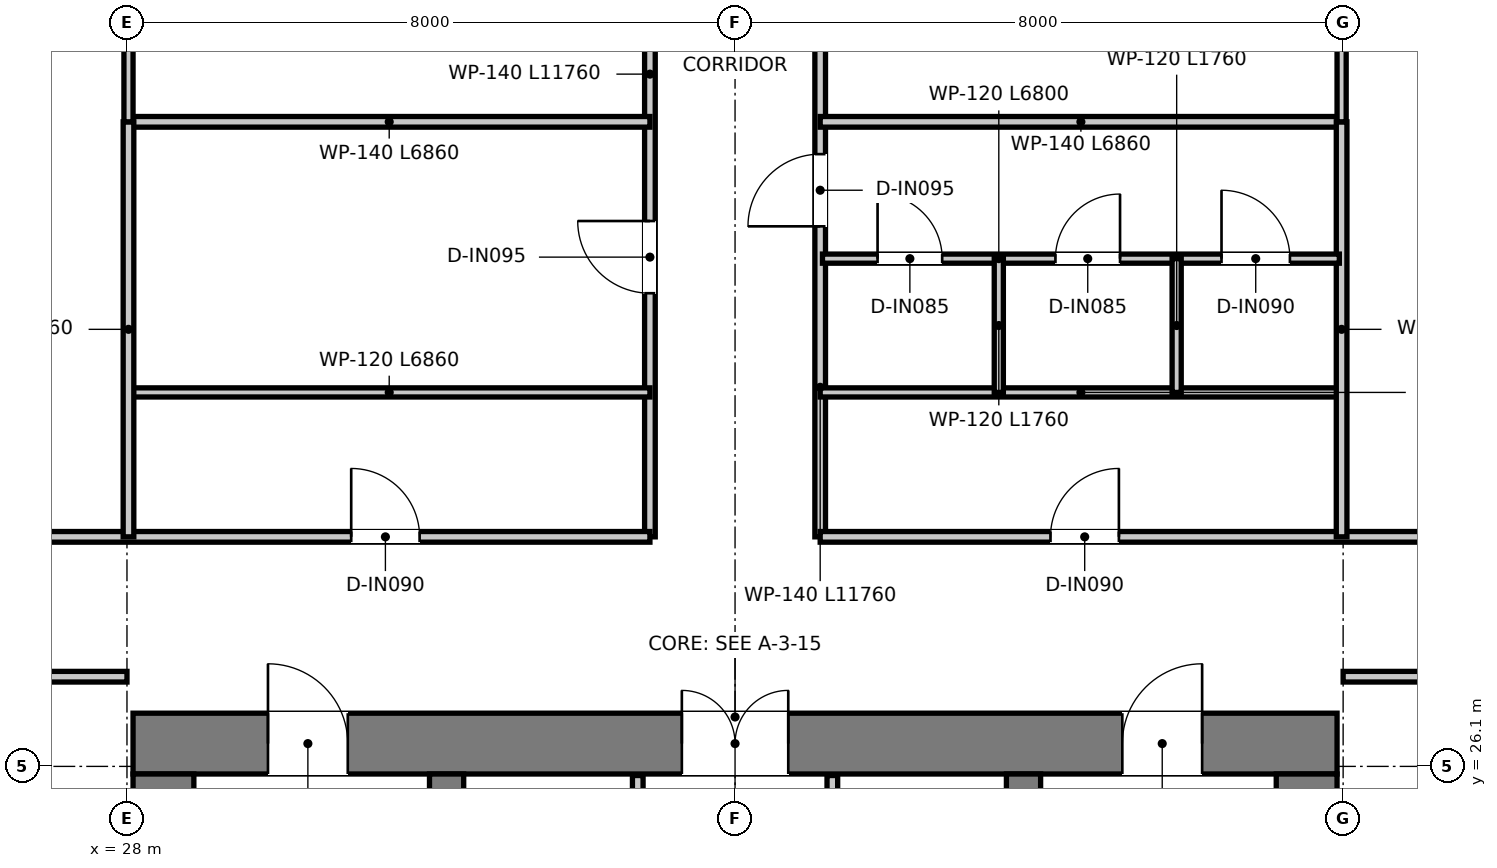
"""IFC4 building model, lengths in metres.
Left out: names, types, materials, properties, quantities, classifications, styles, units other than length and angle.
Written with IfcOpenShell. Run it as: python <this file> out.ifc"""

import sys

from ifc_helpers import new_model, si_unit, direction, frame, frame_2d, origin, place, context, subcontext, project, spatial, rectangle, extrude, element, fill, save


model = new_model("IFC4")
c1 = context("Model", 3, precision=1e-05, world=origin(), true_north=direction((0.0, 1.0)))
c2 = subcontext(c1, "Body", "Model", "MODEL_VIEW")
j1 = project(units=[si_unit("LENGTHUNIT", "METRE"), si_unit("PLANEANGLEUNIT", "RADIAN")], contexts=[c1])
p1 = place(None, origin())
s1 = spatial("IfcSite", under=j1, at=p1, CompositionType="ELEMENT")
p2 = place(p1, origin())
s2 = spatial("IfcBuilding", under=s1, at=p2, CompositionType="ELEMENT")
p3 = place(p2, frame((0.0, 0.0, 197.55)))
s3 = spatial("IfcBuildingStorey", under=s2, at=p3, CompositionType="ELEMENT", Elevation=197.55)
p4 = place(p3, frame((28.08, 26.4, 0.0), z_axis=(0.0, 0.0, 1.0), x_axis=(1.0, 0.0, 0.0)))
e1 = element("IfcWall", 1, at=p4, inside=s3, PredefinedType="SHEAR", context=c2, shape_type="SweptSolid", body=[
    extrude(rectangle(XDim=15.84, YDim=0.8, at=frame_2d((7.92, 0.0))), origin(), (0.0, 0.0, 1.0), 3.95),
])
p5 = place(p4, frame((7.22, 0.0, 0.0)))
e2 = element("IfcOpeningElement", 2, at=p5, cuts=e1, PredefinedType="OPENING", context=c2, shape_type="SweptSolid", body=[
    extrude(rectangle(XDim=1.4, YDim=2.2, at=frame_2d((0.7, 1.1))), frame((0.0, 0.41, 0.0), z_axis=(0.0, -1.0, 0.0), x_axis=(1.0, 0.0, 0.0)), (0.0, 0.0, 1.0), 0.82),
])
p6 = place(p4, frame((1.775, 0.0, 0.0)))
e3 = element("IfcOpeningElement", 3, at=p6, cuts=e1, PredefinedType="OPENING", context=c2, shape_type="SweptSolid", body=[
    extrude(rectangle(XDim=1.05, YDim=2.1, at=frame_2d((0.525, 1.05))), frame((0.0, 0.41, 0.0), z_axis=(0.0, -1.0, 0.0), x_axis=(1.0, 0.0, 0.0)), (0.0, 0.0, 1.0), 0.82),
])
p7 = place(p4, frame((13.015, 0.0, 0.0)))
e4 = element("IfcOpeningElement", 4, at=p7, cuts=e1, PredefinedType="OPENING", context=c2, shape_type="SweptSolid", body=[
    extrude(rectangle(XDim=1.05, YDim=2.1, at=frame_2d((0.525, 1.05))), frame((0.0, 0.41, 0.0), z_axis=(0.0, -1.0, 0.0), x_axis=(1.0, 0.0, 0.0)), (0.0, 0.0, 1.0), 0.82),
])
for number, where, z_axis, x_axis in (
    (5, (28.48, 11.3, 0.0), (0.0, 0.0, 1.0), (0.0, 1.0, 0.0)),
    (6, (43.52, 11.3, 0.0), (0.0, 0.0, 1.0), (0.0, 1.0, 0.0)),
):
    element("IfcWall", number, at=place(p3, frame(where, z_axis=z_axis, x_axis=x_axis)), inside=s3, PredefinedType="SHEAR", context=c2, shape_type="SweptSolid", body=[
        extrude(rectangle(XDim=14.7, YDim=0.8, at=frame_2d((7.35, 0.0))), origin(), (0.0, 0.0, 1.0), 3.95),
    ])
p8 = place(p3, frame((32.205, 13.22, 0.0), z_axis=(0.0, 0.0, 1.0), x_axis=(0.0, 1.0, 0.0)))
e7 = element("IfcWall", 7, at=p8, inside=s3, PredefinedType="SHEAR", context=c2, shape_type="SweptSolid", body=[
    extrude(rectangle(XDim=12.78, YDim=0.45, at=frame_2d((6.39, 0.0))), origin(), (0.0, 0.0, 1.0), 3.95),
])
p9 = place(p8, frame((10.58, 0.0, 0.0)))
e8 = element("IfcOpeningElement", 8, at=p9, cuts=e7, PredefinedType="OPENING", context=c2, shape_type="SweptSolid", body=[
    extrude(rectangle(XDim=1.1, YDim=2.15, at=frame_2d((0.55, 1.075))), frame((0.0, 0.235, 0.0), z_axis=(0.0, -1.0, 0.0), x_axis=(1.0, 0.0, 0.0)), (0.0, 0.0, 1.0), 0.47),
])
p10 = place(p3, frame((39.795, 13.22, 0.0), z_axis=(0.0, 0.0, 1.0), x_axis=(0.0, 1.0, 0.0)))
e9 = element("IfcWall", 9, at=p10, inside=s3, PredefinedType="SHEAR", context=c2, shape_type="SweptSolid", body=[
    extrude(rectangle(XDim=12.78, YDim=0.45, at=frame_2d((6.39, 0.0))), origin(), (0.0, 0.0, 1.0), 3.95),
])
p11 = place(p10, frame((10.58, 0.0, 0.0)))
e10 = element("IfcOpeningElement", 10, at=p11, cuts=e9, PredefinedType="OPENING", context=c2, shape_type="SweptSolid", body=[
    extrude(rectangle(XDim=1.1, YDim=2.15, at=frame_2d((0.55, 1.075))), frame((0.0, 0.235, 0.0), z_axis=(0.0, -1.0, 0.0), x_axis=(1.0, 0.0, 0.0)), (0.0, 0.0, 1.0), 0.47),
])
p12 = place(p3, frame((34.72, 20.2, 0.0), z_axis=(0.0, 0.0, 1.0), x_axis=(0.0, 1.0, 0.0)))
e11 = element("IfcWall", 11, at=p12, inside=s3, PredefinedType="PARTITIONING", context=c2, shape_type="SweptSolid", body=[
    extrude(rectangle(XDim=5.78, YDim=0.14, at=frame_2d((2.89, 0.0))), origin(), (0.0, 0.0, 1.0), 2.59),
])
p13 = place(p12, frame((1.05, 0.0, 0.0)))
e12 = element("IfcOpeningElement", 12, at=p13, cuts=e11, PredefinedType="OPENING", context=c2, shape_type="SweptSolid", body=[
    extrude(rectangle(XDim=0.9, YDim=2.1, at=frame_2d((0.45, 1.05))), frame((0.0, 0.08, 0.0), z_axis=(0.0, -1.0, 0.0), x_axis=(1.0, 0.0, 0.0)), (0.0, 0.0, 1.0), 0.16),
])
p14 = place(p3, frame((37.28, 20.2, 0.0), z_axis=(0.0, 0.0, 1.0), x_axis=(0.0, 1.0, 0.0)))
e13 = element("IfcWall", 13, at=p14, inside=s3, PredefinedType="PARTITIONING", context=c2, shape_type="SweptSolid", body=[
    extrude(rectangle(XDim=5.78, YDim=0.14, at=frame_2d((2.89, 0.0))), origin(), (0.0, 0.0, 1.0), 2.59),
])
p15 = place(p14, frame((0.95, 0.0, 0.0)))
e14 = element("IfcOpeningElement", 14, at=p15, cuts=e13, PredefinedType="OPENING", context=c2, shape_type="SweptSolid", body=[
    extrude(rectangle(XDim=1.1, YDim=2.15, at=frame_2d((0.55, 1.075))), frame((0.0, 0.08, 0.0), z_axis=(0.0, -1.0, 0.0), x_axis=(1.0, 0.0, 0.0)), (0.0, 0.0, 1.0), 0.16),
])
p16 = place(p3, frame((34.88, 29.12, 0.0), z_axis=(0.0, 0.0, 1.0), x_axis=(0.0, 1.0, 0.0)))
e15 = element("IfcWall", 15, at=p16, inside=s3, PredefinedType="PARTITIONING", context=c2, shape_type="SweptSolid", body=[
    extrude(rectangle(XDim=11.76, YDim=0.14, at=frame_2d((5.88, 0.0))), origin(), (0.0, 0.0, 1.0), 2.95),
])
p17 = place(p16, frame((3.205, 0.0, 0.0)))
e16 = element("IfcOpeningElement", 16, at=p17, cuts=e15, PredefinedType="OPENING", context=c2, shape_type="SweptSolid", body=[
    extrude(rectangle(XDim=0.95, YDim=2.1, at=frame_2d((0.475, 1.05))), frame((0.0, 0.08, 0.0), z_axis=(0.0, -1.0, 0.0), x_axis=(1.0, 0.0, 0.0)), (0.0, 0.0, 1.0), 0.16),
])
p18 = place(p16, frame((8.02, 0.0, 0.0)))
e17 = element("IfcOpeningElement", 17, at=p18, cuts=e15, PredefinedType="OPENING", context=c2, shape_type="SweptSolid", body=[
    extrude(rectangle(XDim=0.9, YDim=2.1, at=frame_2d((0.45, 1.05))), frame((0.0, 0.08, 0.0), z_axis=(0.0, -1.0, 0.0), x_axis=(1.0, 0.0, 0.0)), (0.0, 0.0, 1.0), 0.16),
])
p19 = place(p3, frame((37.12, 29.12, 0.0), z_axis=(0.0, 0.0, 1.0), x_axis=(0.0, 1.0, 0.0)))
e18 = element("IfcWall", 18, at=p19, inside=s3, PredefinedType="PARTITIONING", context=c2, shape_type="SweptSolid", body=[
    extrude(rectangle(XDim=11.76, YDim=0.14, at=frame_2d((5.88, 0.0))), origin(), (0.0, 0.0, 1.0), 2.95),
])
p20 = place(p19, frame((4.085, 0.0, 0.0)))
e19 = element("IfcOpeningElement", 19, at=p20, cuts=e18, PredefinedType="OPENING", context=c2, shape_type="SweptSolid", body=[
    extrude(rectangle(XDim=0.95, YDim=2.1, at=frame_2d((0.475, 1.05))), frame((0.0, 0.08, 0.0), z_axis=(0.0, -1.0, 0.0), x_axis=(1.0, 0.0, 0.0)), (0.0, 0.0, 1.0), 0.16),
])
p21 = place(p19, frame((8.02, 0.0, 0.0)))
e20 = element("IfcOpeningElement", 20, at=p21, cuts=e18, PredefinedType="OPENING", context=c2, shape_type="SweptSolid", body=[
    extrude(rectangle(XDim=0.9, YDim=2.1, at=frame_2d((0.45, 1.05))), frame((0.0, 0.08, 0.0), z_axis=(0.0, -1.0, 0.0), x_axis=(1.0, 0.0, 0.0)), (0.0, 0.0, 1.0), 0.16),
])
p22 = place(p3, frame((10.765, 29.12, 0.0), z_axis=(0.0, 0.0, 1.0), x_axis=(1.0, 0.0, 0.0)))
e21 = element("IfcWall", 21, at=p22, inside=s3, PredefinedType="PARTITIONING", context=c2, shape_type="SweptSolid", body=[
    extrude(rectangle(XDim=24.115, YDim=0.14, at=frame_2d((12.058, 0.0))), origin(), (0.0, 0.0, 1.0), 2.95),
])
p23 = place(p22, frame((20.185, 0.0, 0.0)))
e22 = element("IfcOpeningElement", 22, at=p23, cuts=e21, PredefinedType="OPENING", context=c2, shape_type="SweptSolid", body=[
    extrude(rectangle(XDim=0.9, YDim=2.1, at=frame_2d((0.45, 1.05))), frame((0.0, 0.08, 0.0), z_axis=(0.0, -1.0, 0.0), x_axis=(1.0, 0.0, 0.0)), (0.0, 0.0, 1.0), 0.16),
])
p24 = place(p22, frame((4.115, 0.0, 0.0)))
e23 = element("IfcOpeningElement", 23, at=p24, cuts=e21, PredefinedType="OPENING", context=c2, shape_type="SweptSolid", body=[
    extrude(rectangle(XDim=0.9, YDim=2.1, at=frame_2d((0.45, 1.05))), frame((0.0, 0.08, 0.0), z_axis=(0.0, -1.0, 0.0), x_axis=(1.0, 0.0, 0.0)), (0.0, 0.0, 1.0), 0.16),
])
p25 = place(p22, frame((11.935, 0.0, 0.0)))
e24 = element("IfcOpeningElement", 24, at=p25, cuts=e21, PredefinedType="OPENING", context=c2, shape_type="SweptSolid", body=[
    extrude(rectangle(XDim=0.9, YDim=2.1, at=frame_2d((0.45, 1.05))), frame((0.0, 0.08, 0.0), z_axis=(0.0, -1.0, 0.0), x_axis=(1.0, 0.0, 0.0)), (0.0, 0.0, 1.0), 0.16),
])
p26 = place(p22, frame((14.985, 0.0, 0.0)))
e25 = element("IfcOpeningElement", 25, at=p26, cuts=e21, PredefinedType="OPENING", context=c2, shape_type="SweptSolid", body=[
    extrude(rectangle(XDim=0.9, YDim=2.1, at=frame_2d((0.45, 1.05))), frame((0.0, 0.08, 0.0), z_axis=(0.0, -1.0, 0.0), x_axis=(1.0, 0.0, 0.0)), (0.0, 0.0, 1.0), 0.16),
])
p27 = place(p3, frame((37.12, 29.12, 0.0), z_axis=(0.0, 0.0, 1.0), x_axis=(1.0, 0.0, 0.0)))
e26 = element("IfcWall", 26, at=p27, inside=s3, PredefinedType="PARTITIONING", context=c2, shape_type="SweptSolid", body=[
    extrude(rectangle(XDim=24.697, YDim=0.14, at=frame_2d((12.348, 0.0))), origin(), (0.0, 0.0, 1.0), 2.95),
])
p28 = place(p27, frame((3.03, 0.0, 0.0)))
e27 = element("IfcOpeningElement", 27, at=p28, cuts=e26, PredefinedType="OPENING", context=c2, shape_type="SweptSolid", body=[
    extrude(rectangle(XDim=0.9, YDim=2.1, at=frame_2d((0.45, 1.05))), frame((0.0, 0.08, 0.0), z_axis=(0.0, -1.0, 0.0), x_axis=(1.0, 0.0, 0.0)), (0.0, 0.0, 1.0), 0.16),
])
p29 = place(p27, frame((9.17, 0.0, 0.0)))
e28 = element("IfcOpeningElement", 28, at=p29, cuts=e26, PredefinedType="OPENING", context=c2, shape_type="SweptSolid", body=[
    extrude(rectangle(XDim=0.9, YDim=2.1, at=frame_2d((0.45, 1.05))), frame((0.0, 0.08, 0.0), z_axis=(0.0, -1.0, 0.0), x_axis=(1.0, 0.0, 0.0)), (0.0, 0.0, 1.0), 0.16),
])
p30 = place(p27, frame((18.6, 0.0, 0.0)))
e29 = element("IfcOpeningElement", 29, at=p30, cuts=e26, PredefinedType="OPENING", context=c2, shape_type="SweptSolid", body=[
    extrude(rectangle(XDim=0.9, YDim=2.1, at=frame_2d((0.45, 1.05))), frame((0.0, 0.08, 0.0), z_axis=(0.0, -1.0, 0.0), x_axis=(1.0, 0.0, 0.0)), (0.0, 0.0, 1.0), 0.16),
])
p31 = place(p3, frame((9.422, 27.28, 0.0), z_axis=(0.0, 0.0, 1.0), x_axis=(1.0, 0.0, 0.0)))
e30 = element("IfcWall", 30, at=p31, inside=s3, PredefinedType="PARTITIONING", context=c2, shape_type="SweptSolid", body=[
    extrude(rectangle(XDim=18.578, YDim=0.14, at=frame_2d((9.289, 0.0))), origin(), (0.0, 0.0, 1.0), 2.95),
])
p32 = place(p31, frame((6.608, 0.0, 0.0)))
e31 = element("IfcOpeningElement", 31, at=p32, cuts=e30, PredefinedType="OPENING", context=c2, shape_type="SweptSolid", body=[
    extrude(rectangle(XDim=0.9, YDim=2.1, at=frame_2d((0.45, 1.05))), frame((0.0, 0.08, 0.0), z_axis=(0.0, -1.0, 0.0), x_axis=(1.0, 0.0, 0.0)), (0.0, 0.0, 1.0), 0.16),
])
p33 = place(p31, frame((15.728, 0.0, 0.0)))
e32 = element("IfcOpeningElement", 32, at=p33, cuts=e30, PredefinedType="OPENING", context=c2, shape_type="SweptSolid", body=[
    extrude(rectangle(XDim=0.9, YDim=2.1, at=frame_2d((0.45, 1.05))), frame((0.0, 0.08, 0.0), z_axis=(0.0, -1.0, 0.0), x_axis=(1.0, 0.0, 0.0)), (0.0, 0.0, 1.0), 0.16),
])
p34 = place(p3, frame((44.0, 27.28, 0.0), z_axis=(0.0, 0.0, 1.0), x_axis=(1.0, 0.0, 0.0)))
e33 = element("IfcWall", 33, at=p34, inside=s3, PredefinedType="PARTITIONING", context=c2, shape_type="SweptSolid", body=[
    extrude(rectangle(XDim=19.425, YDim=0.14, at=frame_2d((9.712, 0.0))), origin(), (0.0, 0.0, 1.0), 2.95),
])
p35 = place(p34, frame((2.1, 0.0, 0.0)))
e34 = element("IfcOpeningElement", 34, at=p35, cuts=e33, PredefinedType="OPENING", context=c2, shape_type="SweptSolid", body=[
    extrude(rectangle(XDim=0.9, YDim=2.1, at=frame_2d((0.45, 1.05))), frame((0.0, 0.08, 0.0), z_axis=(0.0, -1.0, 0.0), x_axis=(1.0, 0.0, 0.0)), (0.0, 0.0, 1.0), 0.16),
])
p36 = place(p34, frame((11.22, 0.0, 0.0)))
e35 = element("IfcOpeningElement", 35, at=p36, cuts=e33, PredefinedType="OPENING", context=c2, shape_type="SweptSolid", body=[
    extrude(rectangle(XDim=0.9, YDim=2.1, at=frame_2d((0.45, 1.05))), frame((0.0, 0.08, 0.0), z_axis=(0.0, -1.0, 0.0), x_axis=(1.0, 0.0, 0.0)), (0.0, 0.0, 1.0), 0.16),
])
for number, where, z_axis, x_axis in (
    (36, (28.02, 31.02, 0.0), (0.0, 0.0, 1.0), (1.0, 0.0, 0.0)),
    (37, (37.12, 31.02, 0.0), (0.0, 0.0, 1.0), (1.0, 0.0, 0.0)),
):
    element("IfcWall", number, at=place(p3, frame(where, z_axis=z_axis, x_axis=x_axis)), inside=s3, PredefinedType="PARTITIONING", context=c2, shape_type="SweptSolid", body=[
        extrude(rectangle(XDim=6.86, YDim=0.12, at=frame_2d((3.43, 0.0))), origin(), (0.0, 0.0, 1.0), 3.0),
    ])
for number, where, z_axis, x_axis in (
    (38, (28.02, 34.58, 0.0), (0.0, 0.0, 1.0), (1.0, 0.0, 0.0)),
    (39, (37.12, 34.58, 0.0), (0.0, 0.0, 1.0), (1.0, 0.0, 0.0)),
):
    element("IfcWall", number, at=place(p3, frame(where, z_axis=z_axis, x_axis=x_axis)), inside=s3, PredefinedType="PARTITIONING", context=c2, shape_type="SweptSolid", body=[
        extrude(rectangle(XDim=6.86, YDim=0.14, at=frame_2d((3.43, 0.0))), origin(), (0.0, 0.0, 1.0), 3.0),
    ])
for number, where, z_axis, x_axis in (
    (40, (28.02, 29.12, 0.0), (0.0, 0.0, 1.0), (0.0, 1.0, 0.0)),
    (41, (43.98, 29.12, 0.0), (0.0, 0.0, 1.0), (0.0, 1.0, 0.0)),
):
    element("IfcWall", number, at=place(p3, frame(where, z_axis=z_axis, x_axis=x_axis)), inside=s3, PredefinedType="PARTITIONING", context=c2, shape_type="SweptSolid", body=[
        extrude(rectangle(XDim=5.46, YDim=0.14, at=frame_2d((2.73, 0.0))), origin(), (0.0, 0.0, 1.0), 3.23),
    ])
p37 = place(p3, frame((37.15, 32.78, 0.0), z_axis=(0.0, 0.0, 1.0), x_axis=(1.0, 0.0, 0.0)))
e42 = element("IfcWall", 42, at=p37, inside=s3, PredefinedType="PARTITIONING", context=c2, shape_type="SweptSolid", body=[
    extrude(rectangle(XDim=6.8, YDim=0.12, at=frame_2d((3.4, 0.0))), origin(), (0.0, 0.0, 1.0), 3.0),
])
p38 = place(p37, frame((0.725, 0.0, 0.0)))
e43 = element("IfcOpeningElement", 43, at=p38, cuts=e42, PredefinedType="OPENING", context=c2, shape_type="SweptSolid", body=[
    extrude(rectangle(XDim=0.85, YDim=2.1, at=frame_2d((0.425, 1.05))), frame((0.0, 0.07, 0.0), z_axis=(0.0, -1.0, 0.0), x_axis=(1.0, 0.0, 0.0)), (0.0, 0.0, 1.0), 0.14),
])
p39 = place(p37, frame((3.065, 0.0, 0.0)))
e44 = element("IfcOpeningElement", 44, at=p39, cuts=e42, PredefinedType="OPENING", context=c2, shape_type="SweptSolid", body=[
    extrude(rectangle(XDim=0.85, YDim=2.1, at=frame_2d((0.425, 1.05))), frame((0.0, 0.07, 0.0), z_axis=(0.0, -1.0, 0.0), x_axis=(1.0, 0.0, 0.0)), (0.0, 0.0, 1.0), 0.14),
])
p40 = place(p37, frame((5.25, 0.0, 0.0)))
e45 = element("IfcOpeningElement", 45, at=p40, cuts=e42, PredefinedType="OPENING", context=c2, shape_type="SweptSolid", body=[
    extrude(rectangle(XDim=0.9, YDim=2.1, at=frame_2d((0.45, 1.05))), frame((0.0, 0.07, 0.0), z_axis=(0.0, -1.0, 0.0), x_axis=(1.0, 0.0, 0.0)), (0.0, 0.0, 1.0), 0.14),
])
for number, where, z_axis, x_axis in (
    (46, (39.47, 31.02, 0.0), (0.0, 0.0, 1.0), (0.0, 1.0, 0.0)),
    (47, (41.81, 31.02, 0.0), (0.0, 0.0, 1.0), (0.0, 1.0, 0.0)),
):
    element("IfcWall", number, at=place(p3, frame(where, z_axis=z_axis, x_axis=x_axis)), inside=s3, PredefinedType="PARTITIONING", context=c2, shape_type="SweptSolid", body=[
        extrude(rectangle(XDim=1.76, YDim=0.12, at=frame_2d((0.88, 0.0))), origin(), (0.0, 0.0, 1.0), 3.59),
    ])
p41 = place(p3, frame((28.02, 34.58, 0.0), z_axis=(0.0, 0.0, 1.0), x_axis=(0.0, 1.0, 0.0)))
e48 = element("IfcWall", 48, at=p41, inside=s3, PredefinedType="PARTITIONING", context=c2, shape_type="SweptSolid", body=[
    extrude(rectangle(XDim=18.181, YDim=0.12, at=frame_2d((9.09, 0.0))), origin(), (0.0, 0.0, 1.0), 2.95),
])
p42 = place(p3, frame((43.98, 34.58, 0.0), z_axis=(0.0, 0.0, 1.0), x_axis=(0.0, 1.0, 0.0)))
e49 = element("IfcWall", 49, at=p42, inside=s3, PredefinedType="PARTITIONING", context=c2, shape_type="SweptSolid", body=[
    extrude(rectangle(XDim=13.297, YDim=0.12, at=frame_2d((6.648, 0.0))), origin(), (0.0, 0.0, 1.0), 2.95),
])
p43 = place(p5, origin())
e50 = element("IfcDoor", 50, at=p43, inside=s3, OperationType="DOUBLE_DOOR_SINGLE_SWING", PredefinedType="DOOR", context=c2, shape_type="SweptSolid", body=[
    extrude(rectangle(XDim=1.4, YDim=2.2, at=frame_2d((0.7, 1.1))), frame((0.0, 0.025, 0.0), z_axis=(0.0, -1.0, 0.0), x_axis=(1.0, 0.0, 0.0)), (0.0, 0.0, 1.0), 0.05),
])
fill(e2, e50)
p44 = place(p6, origin())
e51 = element("IfcDoor", 51, at=p44, inside=s3, OperationType="SINGLE_SWING_LEFT", PredefinedType="DOOR", context=c2, shape_type="SweptSolid", body=[
    extrude(rectangle(XDim=1.05, YDim=2.1, at=frame_2d((0.525, 1.05))), frame((0.0, 0.025, 0.0), z_axis=(0.0, -1.0, 0.0), x_axis=(1.0, 0.0, 0.0)), (0.0, 0.0, 1.0), 0.05),
])
fill(e3, e51)
p45 = place(p7, origin())
e52 = element("IfcDoor", 52, at=p45, inside=s3, OperationType="SINGLE_SWING_RIGHT", PredefinedType="DOOR", context=c2, shape_type="SweptSolid", body=[
    extrude(rectangle(XDim=1.05, YDim=2.1, at=frame_2d((0.525, 1.05))), frame((0.0, 0.025, 0.0), z_axis=(0.0, -1.0, 0.0), x_axis=(1.0, 0.0, 0.0)), (0.0, 0.0, 1.0), 0.05),
])
fill(e4, e52)
p46 = place(p23, origin())
e53 = element("IfcDoor", 53, at=p46, inside=s3, OperationType="SINGLE_SWING_LEFT", PredefinedType="DOOR", context=c2, shape_type="SweptSolid", body=[
    extrude(rectangle(XDim=0.9, YDim=2.1, at=frame_2d((0.45, 1.05))), frame((0.0, 0.025, 0.0), z_axis=(0.0, -1.0, 0.0), x_axis=(1.0, 0.0, 0.0)), (0.0, 0.0, 1.0), 0.05),
])
fill(e22, e53)
p47 = place(p28, origin())
e54 = element("IfcDoor", 54, at=p47, inside=s3, OperationType="SINGLE_SWING_RIGHT", PredefinedType="DOOR", context=c2, shape_type="SweptSolid", body=[
    extrude(rectangle(XDim=0.9, YDim=2.1, at=frame_2d((0.45, 1.05))), frame((0.0, 0.025, 0.0), z_axis=(0.0, -1.0, 0.0), x_axis=(1.0, 0.0, 0.0)), (0.0, 0.0, 1.0), 0.05),
])
fill(e27, e54)
p48 = place(p20, origin())
e55 = element("IfcDoor", 55, at=p48, inside=s3, OperationType="SINGLE_SWING_LEFT", PredefinedType="DOOR", context=c2, shape_type="SweptSolid", body=[
    extrude(rectangle(XDim=0.95, YDim=2.1, at=frame_2d((0.475, 1.05))), frame((0.0, 0.025, 0.0), z_axis=(0.0, -1.0, 0.0), x_axis=(1.0, 0.0, 0.0)), (0.0, 0.0, 1.0), 0.05),
])
fill(e19, e55)
p49 = place(p17, origin())
e56 = element("IfcDoor", 56, at=p49, inside=s3, OperationType="SINGLE_SWING_RIGHT", PredefinedType="DOOR", context=c2, shape_type="SweptSolid", body=[
    extrude(rectangle(XDim=0.95, YDim=2.1, at=frame_2d((0.475, 1.05))), frame((0.0, 0.025, 0.0), z_axis=(0.0, -1.0, 0.0), x_axis=(1.0, 0.0, 0.0)), (0.0, 0.0, 1.0), 0.05),
])
fill(e16, e56)
p50 = place(p38, origin())
e57 = element("IfcDoor", 57, at=p50, inside=s3, OperationType="SINGLE_SWING_LEFT", PredefinedType="DOOR", context=c2, shape_type="SweptSolid", body=[
    extrude(rectangle(XDim=0.85, YDim=2.1, at=frame_2d((0.425, 1.05))), frame((0.0, 0.025, 0.0), z_axis=(0.0, -1.0, 0.0), x_axis=(1.0, 0.0, 0.0)), (0.0, 0.0, 1.0), 0.05),
])
fill(e43, e57)
p51 = place(p39, origin())
e58 = element("IfcDoor", 58, at=p51, inside=s3, OperationType="SINGLE_SWING_RIGHT", PredefinedType="DOOR", context=c2, shape_type="SweptSolid", body=[
    extrude(rectangle(XDim=0.85, YDim=2.1, at=frame_2d((0.425, 1.05))), frame((0.0, 0.025, 0.0), z_axis=(0.0, -1.0, 0.0), x_axis=(1.0, 0.0, 0.0)), (0.0, 0.0, 1.0), 0.05),
])
fill(e44, e58)
p52 = place(p40, origin())
e59 = element("IfcDoor", 59, at=p52, inside=s3, OperationType="SINGLE_SWING_LEFT", PredefinedType="DOOR", context=c2, shape_type="SweptSolid", body=[
    extrude(rectangle(XDim=0.9, YDim=2.1, at=frame_2d((0.45, 1.05))), frame((0.0, 0.025, 0.0), z_axis=(0.0, -1.0, 0.0), x_axis=(1.0, 0.0, 0.0)), (0.0, 0.0, 1.0), 0.05),
])
fill(e45, e59)
save(model, sys.argv[1])
